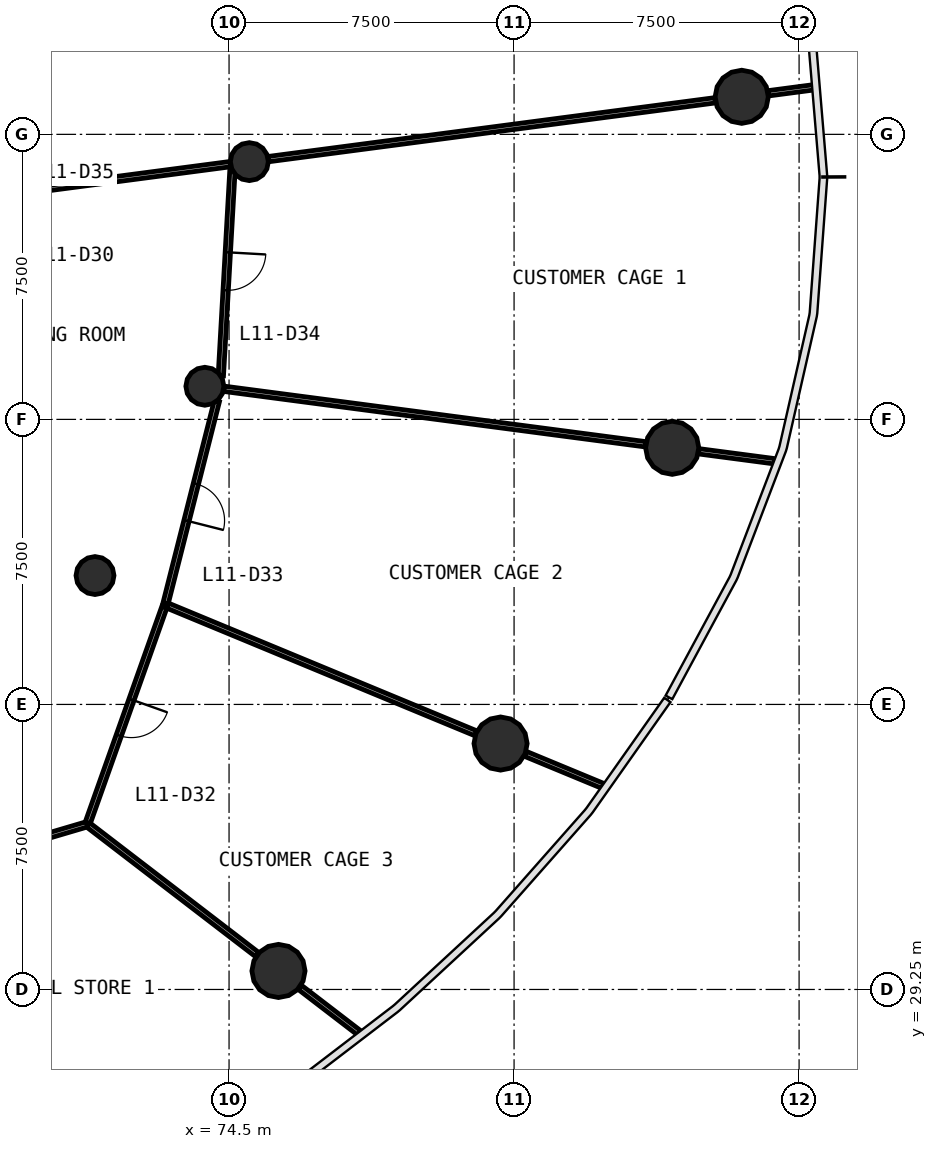
"""IFC4 building model, lengths in metres.
Left out: names, types, materials, properties, quantities, classifications, styles, units other than length and angle.
Written with IfcOpenShell. Run it as: python <this file> out.ifc"""

import sys

from ifc_helpers import new_model, si_unit, direction, frame, frame_2d, origin, origin_2d, place, context, subcontext, project, spatial, rectangle, circle, extrude, source, transform, mapped, element, fill, save


model = new_model("IFC4")
c1 = context("Model", 3, precision=1e-05, world=origin(), true_north=direction((0.0, 1.0)))
c2 = subcontext(c1, "Body", "Model", "MODEL_VIEW")
j1 = project(units=[si_unit("LENGTHUNIT", "METRE"), si_unit("PLANEANGLEUNIT", "RADIAN")], contexts=[c1])
p1 = place(None, origin())
s1 = spatial("IfcSite", under=j1, at=p1, CompositionType="ELEMENT")
p2 = place(p1, origin())
s2 = spatial("IfcBuilding", under=s1, at=p2, CompositionType="ELEMENT")
p3 = place(p2, frame((0.0, 0.0, 49.0)))
s3 = spatial("IfcBuildingStorey", under=s2, at=p3, CompositionType="ELEMENT", Elevation=49.0)
m1 = source(origin(), c2, "Body", "SweptSolid", [
    extrude(circle(Radius=0.7, at=origin_2d()), origin(), (0.0, 0.0, 1.0), 4.4),
])
for number, where, z_axis, x_axis in (
    (1, (87.99, 52.738, 0.0), (0.0, 0.0, 1.0), (1.0, 0.0, 0.0)),
    (2, (75.801, 29.737, 0.0), (0.0, 0.0, 1.0), (1.0, 0.0, 0.0)),
    (3, (81.645, 35.721, 0.0), (0.0, 0.0, 1.0), (1.0, 0.0, 0.0)),
    (4, (86.161, 43.503, 0.0), (0.0, 0.0, 1.0), (1.0, 0.0, 0.0)),
):
    element("IfcColumn", number, at=place(p3, frame(where, z_axis=z_axis, x_axis=x_axis)), inside=s3, PredefinedType="COLUMN", context=c2, shape_type="MappedRepresentation", body=[
        mapped(m1, transform((0.0, 0.0, 0.0), scale=1.0)),
    ])
m2 = source(origin(), c2, "Body", "SweptSolid", [
    extrude(circle(Radius=0.5, at=origin_2d()), origin(), (0.0, 0.0, 1.0), 4.4),
])
for number, where, z_axis, x_axis in (
    (5, (75.034, 51.032, 0.0), (0.0, 0.0, 1.0), (1.0, 0.0, 0.0)),
    (6, (70.972, 40.141, 0.0), (0.0, 0.0, 1.0), (1.0, 0.0, 0.0)),
    (7, (73.863, 45.122, 0.0), (0.0, 0.0, 1.0), (1.0, 0.0, 0.0)),
):
    element("IfcColumn", number, at=place(p3, frame(where, z_axis=z_axis, x_axis=x_axis)), inside=s3, PredefinedType="COLUMN", context=c2, shape_type="MappedRepresentation", body=[
        mapped(m2, transform((0.0, 0.0, 0.0), scale=1.0)),
    ])
p4 = place(p3, frame((75.534, 51.098, 0.0), z_axis=(0.0, 0.0, 1.0), x_axis=(0.991446586451, 0.130513088287, 0.0)))
e8 = element("IfcWall", 8, at=p4, inside=s3, PredefinedType="PARTITIONING", context=c2, shape_type="SweptSolid", body=[
    extrude(rectangle(XDim=11.86, YDim=0.14, at=frame_2d((5.93, 0.0))), origin(), (0.0, 0.0, 1.0), 3.05),
])
p5 = place(p3, frame((74.363, 45.056, 0.0), z_axis=(0.0, 0.0, 1.0), x_axis=(0.991443306772, -0.130538000051, 0.0)))
e9 = element("IfcWall", 9, at=p5, inside=s3, PredefinedType="PARTITIONING", context=c2, shape_type="SweptSolid", body=[
    extrude(rectangle(XDim=11.195, YDim=0.14, at=frame_2d((5.598, 0.0))), origin(), (0.0, 0.0, 1.0), 3.05),
])
p6 = place(p3, frame((72.821, 39.375, 0.0), z_axis=(0.0, 0.0, 1.0), x_axis=(0.923875203153, -0.382693884193, 0.0)))
e10 = element("IfcWall", 10, at=p6, inside=s3, PredefinedType="PARTITIONING", context=c2, shape_type="SweptSolid", body=[
    extrude(rectangle(XDim=8.845, YDim=0.14, at=frame_2d((4.423, 0.0))), origin(), (0.0, 0.0, 1.0), 3.05),
])
p7 = place(p3, frame((67.49, 50.039, 0.0), z_axis=(0.0, 0.0, 1.0), x_axis=(0.99144622305, 0.130515848849, 0.0)))
e11 = element("IfcWall", 11, at=p7, inside=s3, PredefinedType="PARTITIONING", context=c2, shape_type="SweptSolid", body=[
    extrude(rectangle(XDim=7.104, YDim=0.14, at=frame_2d((3.552, 0.0))), origin(), (0.0, 0.0, 1.0), 3.05),
])
p8 = place(p3, frame((70.769, 33.598, 0.0), z_axis=(0.0, 0.0, 1.0), x_axis=(-0.959164410747, -0.282849134974, 0.0)))
e12 = element("IfcWall", 12, at=p8, inside=s3, PredefinedType="PARTITIONING", context=c2, shape_type="SweptSolid", body=[
    extrude(rectangle(XDim=6.562, YDim=0.14, at=frame_2d((3.281, 0.0))), origin(), (0.0, 0.0, 1.0), 3.05),
])
p9 = place(p8, frame((2.712, 0.0, 0.0)))
e13 = element("IfcOpeningElement", 13, at=p9, cuts=e12, PredefinedType="OPENING", context=c2, shape_type="SweptSolid", body=[
    extrude(rectangle(XDim=1.0, YDim=2.1, at=frame_2d((0.5, 1.05))), frame((0.0, 0.08, 0.0), z_axis=(0.0, -1.0, 0.0), x_axis=(1.0, 0.0, 0.0)), (0.0, 0.0, 1.0), 0.16),
])
p10 = place(p3, frame((72.798, 39.309, 0.0), z_axis=(0.0, 0.0, 1.0), x_axis=(-0.334820387554, -0.942281968456, 0.0)))
e14 = element("IfcWall", 14, at=p10, inside=s3, PredefinedType="PARTITIONING", context=c2, shape_type="SweptSolid", body=[
    extrude(rectangle(XDim=6.031, YDim=0.14, at=frame_2d((3.016, 0.0))), origin(), (0.0, 0.0, 1.0), 3.05),
])
p11 = place(p10, frame((2.581, 0.0, 0.0)))
e15 = element("IfcOpeningElement", 15, at=p11, cuts=e14, PredefinedType="OPENING", context=c2, shape_type="SweptSolid", body=[
    extrude(rectangle(XDim=1.0, YDim=2.1, at=frame_2d((0.5, 1.05))), frame((0.0, 0.08, 0.0), z_axis=(0.0, -1.0, 0.0), x_axis=(1.0, 0.0, 0.0)), (0.0, 0.0, 1.0), 0.16),
])
p12 = place(p3, frame((70.793, 33.58, 0.0), z_axis=(0.0, 0.0, 1.0), x_axis=(0.793369467151, -0.6087404115, 0.0)))
e16 = element("IfcWall", 16, at=p12, inside=s3, PredefinedType="PARTITIONING", context=c2, shape_type="SweptSolid", body=[
    extrude(rectangle(XDim=5.608, YDim=0.14, at=frame_2d((2.804, 0.0))), origin(), (0.0, 0.0, 1.0), 3.05),
])
p13 = place(p3, frame((74.178, 44.727, 0.0), z_axis=(0.0, 0.0, 1.0), x_axis=(-0.245735490717, -0.969336922129, 0.0)))
e17 = element("IfcWall", 17, at=p13, inside=s3, PredefinedType="PARTITIONING", context=c2, shape_type="SweptSolid", body=[
    extrude(rectangle(XDim=5.491, YDim=0.14, at=frame_2d((2.746, 0.0))), origin(), (0.0, 0.0, 1.0), 3.05),
])
p14 = place(p13, frame((2.241, 0.0, 0.0)))
e18 = element("IfcOpeningElement", 18, at=p14, cuts=e17, PredefinedType="OPENING", context=c2, shape_type="SweptSolid", body=[
    extrude(rectangle(XDim=1.0, YDim=2.1, at=frame_2d((0.5, 1.05))), frame((0.0, 0.08, 0.0), z_axis=(0.0, -1.0, 0.0), x_axis=(1.0, 0.0, 0.0)), (0.0, 0.0, 1.0), 0.16),
])
p15 = place(p3, frame((74.589, 50.793, 0.0), z_axis=(0.0, 0.0, 1.0), x_axis=(-0.056551571082, -0.998399679391, 0.0)))
e19 = element("IfcWall", 19, at=p15, inside=s3, PredefinedType="PARTITIONING", context=c2, shape_type="SweptSolid", body=[
    extrude(rectangle(XDim=5.401, YDim=0.14, at=frame_2d((2.7, 0.0))), origin(), (0.0, 0.0, 1.0), 3.05),
])
p16 = place(p15, frame((2.151, 0.0, 0.0)))
e20 = element("IfcOpeningElement", 20, at=p16, cuts=e19, PredefinedType="OPENING", context=c2, shape_type="SweptSolid", body=[
    extrude(rectangle(XDim=1.0, YDim=2.1, at=frame_2d((0.5, 1.05))), frame((0.0, 0.08, 0.0), z_axis=(0.0, -1.0, 0.0), x_axis=(1.0, 0.0, 0.0)), (0.0, 0.0, 1.0), 0.16),
])
p17 = place(p3, frame((82.296, 35.451, 0.0), z_axis=(0.0, 0.0, 1.0), x_axis=(0.923899948789, -0.382634139392, 0.0)))
e21 = element("IfcWall", 21, at=p17, inside=s3, PredefinedType="PARTITIONING", context=c2, shape_type="SweptSolid", body=[
    extrude(rectangle(XDim=2.215, YDim=0.14, at=frame_2d((1.107, 0.0))), origin(), (0.0, 0.0, 1.0), 3.05),
])
p18 = place(p3, frame((86.859, 43.411, 0.0), z_axis=(0.0, 0.0, 1.0), x_axis=(0.991443960057, -0.130533038219, 0.0)))
e22 = element("IfcWall", 22, at=p18, inside=s3, PredefinedType="PARTITIONING", context=c2, shape_type="SweptSolid", body=[
    extrude(rectangle(XDim=2.01, YDim=0.14, at=frame_2d((1.005, 0.0))), origin(), (0.0, 0.0, 1.0), 3.05),
])
p19 = place(p3, frame((76.359, 29.309, 0.0), z_axis=(0.0, 0.0, 1.0), x_axis=(0.793312100237, -0.608815170325, 0.0)))
e23 = element("IfcWall", 23, at=p19, inside=s3, PredefinedType="PARTITIONING", context=c2, shape_type="SweptSolid", body=[
    extrude(rectangle(XDim=1.977, YDim=0.14, at=frame_2d((0.989, 0.0))), origin(), (0.0, 0.0, 1.0), 3.05),
])
p20 = place(p3, frame((88.689, 52.83, 0.0), z_axis=(0.0, 0.0, 1.0), x_axis=(0.991424298155, 0.130682290411, 0.0)))
e24 = element("IfcWall", 24, at=p20, inside=s3, PredefinedType="PARTITIONING", context=c2, shape_type="SweptSolid", body=[
    extrude(rectangle(XDim=1.22, YDim=0.14, at=frame_2d((0.61, 0.0))), origin(), (0.0, 0.0, 1.0), 3.05),
])
m3 = source(origin(), c2, "Body", "SweptSolid", [
    extrude(rectangle(XDim=1.0, YDim=2.1, at=frame_2d((0.5, 1.05))), frame((0.0, 0.025, 0.0), z_axis=(0.0, -1.0, 0.0), x_axis=(1.0, 0.0, 0.0)), (0.0, 0.0, 1.0), 0.05),
])
p21 = place(p11, origin())
e25 = element("IfcDoor", 25, at=p21, inside=s3, OperationType="SINGLE_SWING_LEFT", PredefinedType="DOOR", context=c2, shape_type="MappedRepresentation", body=[
    mapped(m3, transform((0.0, 0.0, 0.0), scale=1.0)),
])
fill(e15, e25)
p22 = place(p14, origin())
e26 = element("IfcDoor", 26, at=p22, inside=s3, OperationType="SINGLE_SWING_RIGHT", PredefinedType="DOOR", context=c2, shape_type="MappedRepresentation", body=[
    mapped(m3, transform((0.0, 0.0, 0.0), scale=1.0)),
])
fill(e18, e26)
p23 = place(p16, origin())
e27 = element("IfcDoor", 27, at=p23, inside=s3, OperationType="SINGLE_SWING_LEFT", PredefinedType="DOOR", context=c2, shape_type="MappedRepresentation", body=[
    mapped(m3, transform((0.0, 0.0, 0.0), scale=1.0)),
])
fill(e20, e27)
save(model, sys.argv[1])
